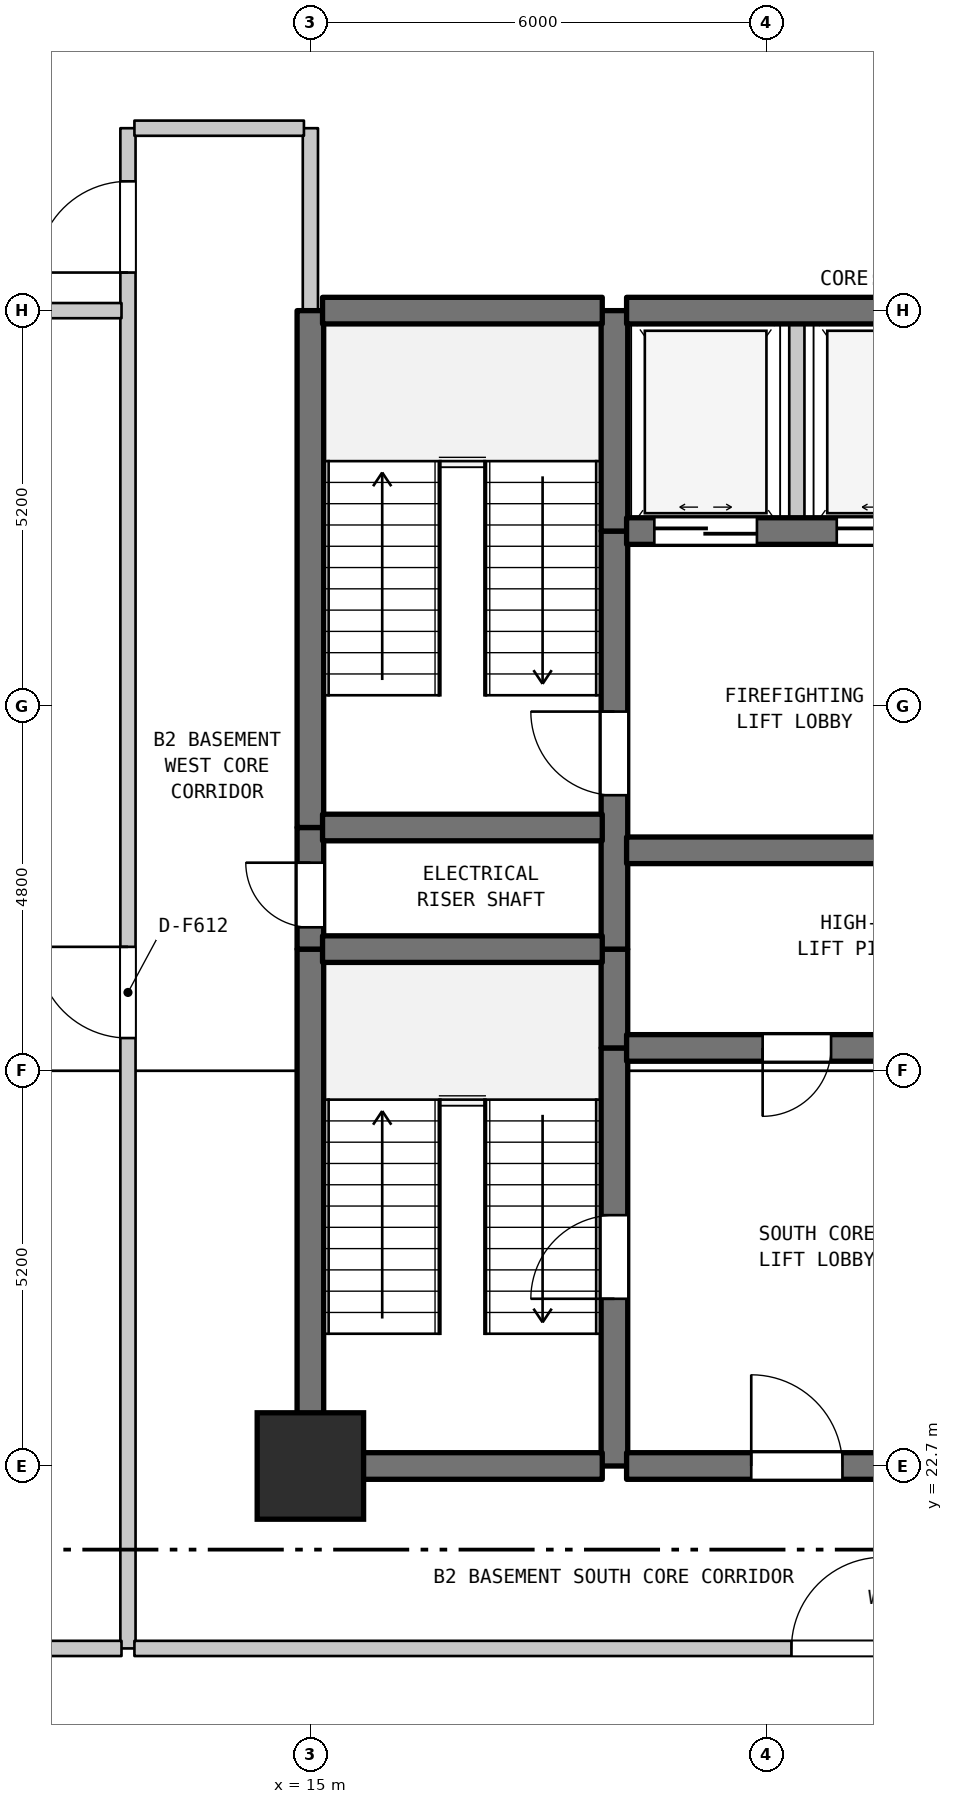
"""IFC4 building model, lengths in metres.
Left out: names, types, materials, properties, quantities, classifications, styles, units other than length and angle.
Written with IfcOpenShell. Run it as: python <this file> out.ifc"""

import sys

from ifc_helpers import new_model, si_unit, direction, frame, frame_2d, origin, origin_2d, place, context, subcontext, project, spatial, rectangle, extrude, element, fill, save


model = new_model("IFC4")
c1 = context("Model", 3, precision=1e-05, world=origin(), true_north=direction((0.0, 1.0)))
c2 = subcontext(c1, "Body", "Model", "MODEL_VIEW")
j1 = project(units=[si_unit("LENGTHUNIT", "METRE"), si_unit("PLANEANGLEUNIT", "RADIAN")], contexts=[c1])
p1 = place(None, origin())
s1 = spatial("IfcSite", under=j1, at=p1, CompositionType="ELEMENT")
p2 = place(p1, origin())
s2 = spatial("IfcBuilding", under=s1, at=p2, CompositionType="ELEMENT")
p3 = place(p2, frame((0.0, 0.0, -9.0)))
s3 = spatial("IfcBuildingStorey", under=s2, at=p3, CompositionType="ELEMENT", Elevation=-9.0)
p4 = place(p3, frame((15.0, 22.7, 0.0), z_axis=(0.0, 0.0, 1.0), x_axis=(1.0, 0.0, 0.0)))
e1 = element("IfcColumn", 1, at=p4, inside=s3, PredefinedType="COLUMN", context=c2, shape_type="SweptSolid", body=[
    extrude(rectangle(XDim=1.4, YDim=1.4, at=origin_2d()), origin(), (0.0, 0.0, 1.0), 4.5),
])
p5 = place(p3, frame((12.6, 20.3, 0.0), z_axis=(0.0, 0.0, 1.0), x_axis=(0.0, 1.0, 0.0)))
e2 = element("IfcWall", 2, at=p5, inside=s3, PredefinedType="STANDARD", context=c2, shape_type="SweptSolid", body=[
    extrude(rectangle(XDim=20.0, YDim=0.2, at=frame_2d((10.0, 0.0))), origin(), (0.0, 0.0, 1.0), 4.16),
])
p6 = place(p5, frame((8.03, 0.0, 0.0)))
e3 = element("IfcOpeningElement", 3, at=p6, cuts=e2, PredefinedType="OPENING", context=c2, shape_type="SweptSolid", body=[
    extrude(rectangle(XDim=1.2, YDim=2.2, at=frame_2d((0.6, 1.1))), frame((0.0, 0.11, 0.0), z_axis=(0.0, -1.0, 0.0), x_axis=(1.0, 0.0, 0.0)), (0.0, 0.0, 1.0), 0.22),
])
p7 = place(p5, frame((18.101, 0.0, 0.0)))
e4 = element("IfcOpeningElement", 4, at=p7, cuts=e2, PredefinedType="OPENING", context=c2, shape_type="SweptSolid", body=[
    extrude(rectangle(XDim=1.2, YDim=2.2, at=frame_2d((0.6, 1.1))), frame((0.0, 0.11, 0.0), z_axis=(0.0, -1.0, 0.0), x_axis=(1.0, 0.0, 0.0)), (0.0, 0.0, 1.0), 0.22),
])
p8 = place(p3, frame((15.0, 22.7, 0.0), z_axis=(0.0, 0.0, 1.0), x_axis=(0.0, 1.0, 0.0)))
e5 = element("IfcWall", 5, at=p8, inside=s3, PredefinedType="SHEAR", context=c2, shape_type="SweptSolid", body=[
    extrude(rectangle(XDim=6.8, YDim=0.35, at=frame_2d((3.4, 0.0))), origin(), (0.0, 0.0, 1.0), 4.16),
])
p9 = place(p3, frame((15.0, 29.5, 0.0), z_axis=(0.0, 0.0, 1.0), x_axis=(0.0, 1.0, 0.0)))
e6 = element("IfcWall", 6, at=p9, inside=s3, PredefinedType="SHEAR", context=c2, shape_type="SweptSolid", body=[
    extrude(rectangle(XDim=1.6, YDim=0.35, at=frame_2d((0.8, 0.0))), origin(), (0.0, 0.0, 1.0), 4.16),
])
p10 = place(p9, frame((0.287, 0.0, 0.0)))
e7 = element("IfcOpeningElement", 7, at=p10, cuts=e6, PredefinedType="OPENING", context=c2, shape_type="SweptSolid", body=[
    extrude(rectangle(XDim=0.85, YDim=2.1, at=frame_2d((0.425, 1.05))), frame((0.0, 0.185, 0.0), z_axis=(0.0, -1.0, 0.0), x_axis=(1.0, 0.0, 0.0)), (0.0, 0.0, 1.0), 0.37),
])
p11 = place(p3, frame((15.0, 31.1, 0.0), z_axis=(0.0, 0.0, 1.0), x_axis=(0.0, 1.0, 0.0)))
e8 = element("IfcWall", 8, at=p11, inside=s3, PredefinedType="SHEAR", context=c2, shape_type="SweptSolid", body=[
    extrude(rectangle(XDim=6.8, YDim=0.35, at=frame_2d((3.4, 0.0))), origin(), (0.0, 0.0, 1.0), 4.16),
])
p12 = place(p3, frame((15.0, 37.9, 0.0), z_axis=(0.0, 0.0, 1.0), x_axis=(0.0, 1.0, 0.0)))
e9 = element("IfcWall", 9, at=p12, inside=s3, PredefinedType="STANDARD", context=c2, shape_type="SweptSolid", body=[
    extrude(rectangle(XDim=2.4, YDim=0.2, at=frame_2d((1.2, 0.0))), origin(), (0.0, 0.0, 1.0), 4.16),
])
p13 = place(p3, frame((19.0, 22.7, 0.0), z_axis=(0.0, 0.0, 1.0), x_axis=(0.0, 1.0, 0.0)))
e10 = element("IfcWall", 10, at=p13, inside=s3, PredefinedType="SHEAR", context=c2, shape_type="SweptSolid", body=[
    extrude(rectangle(XDim=5.5, YDim=0.35, at=frame_2d((2.75, 0.0))), origin(), (0.0, 0.0, 1.0), 4.16),
])
p14 = place(p13, frame((2.2, 0.0, 0.0)))
e11 = element("IfcOpeningElement", 11, at=p14, cuts=e10, PredefinedType="OPENING", context=c2, shape_type="SweptSolid", body=[
    extrude(rectangle(XDim=1.1, YDim=2.15, at=frame_2d((0.55, 1.075))), frame((0.0, 0.185, 0.0), z_axis=(0.0, -1.0, 0.0), x_axis=(1.0, 0.0, 0.0)), (0.0, 0.0, 1.0), 0.37),
])
p15 = place(p3, frame((19.0, 28.2, 0.0), z_axis=(0.0, 0.0, 1.0), x_axis=(0.0, 1.0, 0.0)))
e12 = element("IfcWall", 12, at=p15, inside=s3, PredefinedType="SHEAR", context=c2, shape_type="SweptSolid", body=[
    extrude(rectangle(XDim=1.3, YDim=0.35, at=frame_2d((0.65, 0.0))), origin(), (0.0, 0.0, 1.0), 4.16),
])
p16 = place(p3, frame((19.0, 29.5, 0.0), z_axis=(0.0, 0.0, 1.0), x_axis=(0.0, 1.0, 0.0)))
e13 = element("IfcWall", 13, at=p16, inside=s3, PredefinedType="SHEAR", context=c2, shape_type="SweptSolid", body=[
    extrude(rectangle(XDim=5.5, YDim=0.35, at=frame_2d((2.75, 0.0))), origin(), (0.0, 0.0, 1.0), 4.16),
])
p17 = place(p16, frame((2.025, 0.0, 0.0)))
e14 = element("IfcOpeningElement", 14, at=p17, cuts=e13, PredefinedType="OPENING", context=c2, shape_type="SweptSolid", body=[
    extrude(rectangle(XDim=1.1, YDim=2.15, at=frame_2d((0.55, 1.075))), frame((0.0, 0.185, 0.0), z_axis=(0.0, -1.0, 0.0), x_axis=(1.0, 0.0, 0.0)), (0.0, 0.0, 1.0), 0.37),
])
p18 = place(p3, frame((19.0, 35.0, 0.0), z_axis=(0.0, 0.0, 1.0), x_axis=(0.0, 1.0, 0.0)))
e15 = element("IfcWall", 15, at=p18, inside=s3, PredefinedType="SHEAR", context=c2, shape_type="SweptSolid", body=[
    extrude(rectangle(XDim=2.9, YDim=0.35, at=frame_2d((1.45, 0.0))), origin(), (0.0, 0.0, 1.0), 4.16),
])
p19 = place(p3, frame((21.4, 35.0, 0.0), z_axis=(0.0, 0.0, 1.0), x_axis=(0.0, 1.0, 0.0)))
e16 = element("IfcWall", 16, at=p19, inside=s3, PredefinedType="STANDARD", context=c2, shape_type="SweptSolid", body=[
    extrude(rectangle(XDim=2.9, YDim=0.2, at=frame_2d((1.45, 0.0))), origin(), (0.0, 0.0, 1.0), 4.16),
])
p20 = place(p3, frame((2.01, 20.3, 0.0), z_axis=(0.0, 0.0, 1.0), x_axis=(1.0, 0.0, 0.0)))
e17 = element("IfcWall", 17, at=p20, inside=s3, PredefinedType="STANDARD", context=c2, shape_type="SweptSolid", body=[
    extrude(rectangle(XDim=10.505, YDim=0.2, at=frame_2d((5.252, 0.0))), origin(), (0.0, 0.0, 1.0), 4.16),
])
p21 = place(p3, frame((12.685, 20.3, 0.0), z_axis=(0.0, 0.0, 1.0), x_axis=(1.0, 0.0, 0.0)))
e18 = element("IfcWall", 18, at=p21, inside=s3, PredefinedType="STANDARD", context=c2, shape_type="SweptSolid", body=[
    extrude(rectangle(XDim=20.23, YDim=0.2, at=frame_2d((10.115, 0.0))), origin(), (0.0, 0.0, 1.0), 4.16),
])
p22 = place(p21, frame((8.644, 0.0, 0.0)))
e19 = element("IfcOpeningElement", 19, at=p22, cuts=e18, PredefinedType="OPENING", context=c2, shape_type="SweptSolid", body=[
    extrude(rectangle(XDim=1.2, YDim=2.2, at=frame_2d((0.6, 1.1))), frame((0.0, 0.11, 0.0), z_axis=(0.0, -1.0, 0.0), x_axis=(1.0, 0.0, 0.0)), (0.0, 0.0, 1.0), 0.22),
])
p23 = place(p3, frame((15.16, 22.7, 0.0), z_axis=(0.0, 0.0, 1.0), x_axis=(1.0, 0.0, 0.0)))
e20 = element("IfcWall", 20, at=p23, inside=s3, PredefinedType="SHEAR", context=c2, shape_type="SweptSolid", body=[
    extrude(rectangle(XDim=3.68, YDim=0.35, at=frame_2d((1.84, 0.0))), origin(), (0.0, 0.0, 1.0), 4.16),
])
p24 = place(p3, frame((19.16, 22.7, 0.0), z_axis=(0.0, 0.0, 1.0), x_axis=(1.0, 0.0, 0.0)))
e21 = element("IfcWall", 21, at=p24, inside=s3, PredefinedType="SHEAR", context=c2, shape_type="SweptSolid", body=[
    extrude(rectangle(XDim=4.48, YDim=0.35, at=frame_2d((2.24, 0.0))), origin(), (0.0, 0.0, 1.0), 4.16),
])
p25 = place(p24, frame((1.64, 0.0, 0.0)))
e22 = element("IfcOpeningElement", 22, at=p25, cuts=e21, PredefinedType="OPENING", context=c2, shape_type="SweptSolid", body=[
    extrude(rectangle(XDim=1.2, YDim=2.2, at=frame_2d((0.6, 1.1))), frame((0.0, 0.185, 0.0), z_axis=(0.0, -1.0, 0.0), x_axis=(1.0, 0.0, 0.0)), (0.0, 0.0, 1.0), 0.37),
])
p26 = place(p3, frame((19.16, 28.2, 0.0), z_axis=(0.0, 0.0, 1.0), x_axis=(1.0, 0.0, 0.0)))
e23 = element("IfcWall", 23, at=p26, inside=s3, PredefinedType="SHEAR", context=c2, shape_type="SweptSolid", body=[
    extrude(rectangle(XDim=4.48, YDim=0.35, at=frame_2d((2.24, 0.0))), origin(), (0.0, 0.0, 1.0), 4.16),
])
p27 = place(p26, frame((1.79, 0.0, 0.0)))
e24 = element("IfcOpeningElement", 24, at=p27, cuts=e23, PredefinedType="OPENING", context=c2, shape_type="SweptSolid", body=[
    extrude(rectangle(XDim=0.9, YDim=2.15, at=frame_2d((0.45, 1.075))), frame((0.0, 0.185, 0.0), z_axis=(0.0, -1.0, 0.0), x_axis=(1.0, 0.0, 0.0)), (0.0, 0.0, 1.0), 0.37),
])
p28 = place(p3, frame((15.16, 29.5, 0.0), z_axis=(0.0, 0.0, 1.0), x_axis=(1.0, 0.0, 0.0)))
e25 = element("IfcWall", 25, at=p28, inside=s3, PredefinedType="SHEAR", context=c2, shape_type="SweptSolid", body=[
    extrude(rectangle(XDim=3.68, YDim=0.35, at=frame_2d((1.84, 0.0))), origin(), (0.0, 0.0, 1.0), 4.16),
])
p29 = place(p3, frame((19.16, 30.8, 0.0), z_axis=(0.0, 0.0, 1.0), x_axis=(1.0, 0.0, 0.0)))
e26 = element("IfcWall", 26, at=p29, inside=s3, PredefinedType="SHEAR", context=c2, shape_type="SweptSolid", body=[
    extrude(rectangle(XDim=4.48, YDim=0.35, at=frame_2d((2.24, 0.0))), origin(), (0.0, 0.0, 1.0), 4.16),
])
p30 = place(p3, frame((15.16, 31.1, 0.0), z_axis=(0.0, 0.0, 1.0), x_axis=(1.0, 0.0, 0.0)))
e27 = element("IfcWall", 27, at=p30, inside=s3, PredefinedType="SHEAR", context=c2, shape_type="SweptSolid", body=[
    extrude(rectangle(XDim=3.68, YDim=0.35, at=frame_2d((1.84, 0.0))), origin(), (0.0, 0.0, 1.0), 4.16),
])
p31 = place(p3, frame((19.16, 35.0, 0.0), z_axis=(0.0, 0.0, 1.0), x_axis=(1.0, 0.0, 0.0)))
e28 = element("IfcWall", 28, at=p31, inside=s3, PredefinedType="SHEAR", context=c2, shape_type="SweptSolid", body=[
    extrude(rectangle(XDim=4.48, YDim=0.35, at=frame_2d((2.24, 0.0))), origin(), (0.0, 0.0, 1.0), 4.16),
])
p32 = place(p31, frame((0.365, 0.0, 0.0)))
e29 = element("IfcOpeningElement", 29, at=p32, cuts=e28, PredefinedType="OPENING", context=c2, shape_type="SweptSolid", body=[
    extrude(rectangle(XDim=1.35, YDim=2.2, at=frame_2d((0.675, 1.1))), frame((0.0, 0.185, 0.0), z_axis=(0.0, -1.0, 0.0), x_axis=(1.0, 0.0, 0.0)), (0.0, 0.0, 1.0), 0.37),
])
p33 = place(p31, frame((2.765, 0.0, 0.0)))
e30 = element("IfcOpeningElement", 30, at=p33, cuts=e28, PredefinedType="OPENING", context=c2, shape_type="SweptSolid", body=[
    extrude(rectangle(XDim=1.35, YDim=2.2, at=frame_2d((0.675, 1.1))), frame((0.0, 0.185, 0.0), z_axis=(0.0, -1.0, 0.0), x_axis=(1.0, 0.0, 0.0)), (0.0, 0.0, 1.0), 0.37),
])
p34 = place(p3, frame((15.16, 37.9, 0.0), z_axis=(0.0, 0.0, 1.0), x_axis=(1.0, 0.0, 0.0)))
e31 = element("IfcWall", 31, at=p34, inside=s3, PredefinedType="SHEAR", context=c2, shape_type="SweptSolid", body=[
    extrude(rectangle(XDim=3.68, YDim=0.35, at=frame_2d((1.84, 0.0))), origin(), (0.0, 0.0, 1.0), 4.16),
])
p35 = place(p3, frame((19.16, 37.9, 0.0), z_axis=(0.0, 0.0, 1.0), x_axis=(1.0, 0.0, 0.0)))
e32 = element("IfcWall", 32, at=p35, inside=s3, PredefinedType="SHEAR", context=c2, shape_type="SweptSolid", body=[
    extrude(rectangle(XDim=4.48, YDim=0.35, at=frame_2d((2.24, 0.0))), origin(), (0.0, 0.0, 1.0), 4.16),
])
p36 = place(p3, frame((12.685, 40.3, 0.0), z_axis=(0.0, 0.0, 1.0), x_axis=(1.0, 0.0, 0.0)))
e33 = element("IfcWall", 33, at=p36, inside=s3, PredefinedType="STANDARD", context=c2, shape_type="SweptSolid", body=[
    extrude(rectangle(XDim=2.23, YDim=0.2, at=frame_2d((1.115, 0.0))), origin(), (0.0, 0.0, 1.0), 4.16),
])
p37 = place(p3, frame((9.0, 37.9, 0.0), z_axis=(0.0, 0.0, 1.0), x_axis=(1.0, 0.0, 0.0)))
e34 = element("IfcWall", 34, at=p37, inside=s3, PredefinedType="STANDARD", context=c2, shape_type="SweptSolid", body=[
    extrude(rectangle(XDim=3.515, YDim=0.2, at=frame_2d((1.757, 0.0))), origin(), (0.0, 0.0, 1.0), 3.26),
])
p38 = place(p6, origin())
e35 = element("IfcDoor", 35, at=p38, inside=s3, OperationType="SINGLE_SWING_RIGHT", PredefinedType="DOOR", context=c2, shape_type="SweptSolid", body=[
    extrude(rectangle(XDim=1.2, YDim=2.2, at=frame_2d((0.6, 1.1))), frame((0.0, 0.025, 0.0), z_axis=(0.0, -1.0, 0.0), x_axis=(1.0, 0.0, 0.0)), (0.0, 0.0, 1.0), 0.05),
])
fill(e3, e35)
p39 = place(p7, origin())
e36 = element("IfcDoor", 36, at=p39, inside=s3, OperationType="SINGLE_SWING_LEFT", PredefinedType="DOOR", context=c2, shape_type="SweptSolid", body=[
    extrude(rectangle(XDim=1.2, YDim=2.2, at=frame_2d((0.6, 1.1))), frame((0.0, 0.025, 0.0), z_axis=(0.0, -1.0, 0.0), x_axis=(1.0, 0.0, 0.0)), (0.0, 0.0, 1.0), 0.05),
])
fill(e4, e36)
p40 = place(p10, origin())
e37 = element("IfcDoor", 37, at=p40, inside=s3, OperationType="SINGLE_SWING_RIGHT", PredefinedType="DOOR", context=c2, shape_type="SweptSolid", body=[
    extrude(rectangle(XDim=0.85, YDim=2.1, at=frame_2d((0.425, 1.05))), frame((0.0, 0.025, 0.0), z_axis=(0.0, -1.0, 0.0), x_axis=(1.0, 0.0, 0.0)), (0.0, 0.0, 1.0), 0.05),
])
fill(e7, e37)
p41 = place(p14, origin())
e38 = element("IfcDoor", 38, at=p41, inside=s3, OperationType="SINGLE_SWING_LEFT", PredefinedType="DOOR", context=c2, shape_type="SweptSolid", body=[
    extrude(rectangle(XDim=1.1, YDim=2.15, at=frame_2d((0.55, 1.075))), frame((0.0, 0.025, 0.0), z_axis=(0.0, -1.0, 0.0), x_axis=(1.0, 0.0, 0.0)), (0.0, 0.0, 1.0), 0.05),
])
fill(e11, e38)
p42 = place(p17, origin())
e39 = element("IfcDoor", 39, at=p42, inside=s3, OperationType="SINGLE_SWING_RIGHT", PredefinedType="DOOR", context=c2, shape_type="SweptSolid", body=[
    extrude(rectangle(XDim=1.1, YDim=2.15, at=frame_2d((0.55, 1.075))), frame((0.0, 0.025, 0.0), z_axis=(0.0, -1.0, 0.0), x_axis=(1.0, 0.0, 0.0)), (0.0, 0.0, 1.0), 0.05),
])
fill(e14, e39)
p43 = place(p22, origin())
e40 = element("IfcDoor", 40, at=p43, inside=s3, OperationType="SINGLE_SWING_RIGHT", PredefinedType="DOOR", context=c2, shape_type="SweptSolid", body=[
    extrude(rectangle(XDim=1.2, YDim=2.2, at=frame_2d((0.6, 1.1))), frame((0.0, 0.025, 0.0), z_axis=(0.0, -1.0, 0.0), x_axis=(1.0, 0.0, 0.0)), (0.0, 0.0, 1.0), 0.05),
])
fill(e19, e40)
p44 = place(p25, origin())
e41 = element("IfcDoor", 41, at=p44, inside=s3, OperationType="SINGLE_SWING_LEFT", PredefinedType="DOOR", context=c2, shape_type="SweptSolid", body=[
    extrude(rectangle(XDim=1.2, YDim=2.2, at=frame_2d((0.6, 1.1))), frame((0.0, 0.025, 0.0), z_axis=(0.0, -1.0, 0.0), x_axis=(1.0, 0.0, 0.0)), (0.0, 0.0, 1.0), 0.05),
])
fill(e22, e41)
p45 = place(p27, frame((0.9, 0.0, 0.0), z_axis=(0.0, 0.0, 1.0), x_axis=(-1.0, 0.0, 0.0)))
e42 = element("IfcDoor", 42, at=p45, inside=s3, OperationType="SINGLE_SWING_LEFT", PredefinedType="DOOR", context=c2, shape_type="SweptSolid", body=[
    extrude(rectangle(XDim=0.9, YDim=2.15, at=frame_2d((0.45, 1.075))), frame((0.0, 0.025, 0.0), z_axis=(0.0, -1.0, 0.0), x_axis=(1.0, 0.0, 0.0)), (0.0, 0.0, 1.0), 0.05),
])
fill(e24, e42)
p46 = place(p32, origin())
e43 = element("IfcDoor", 43, at=p46, inside=s3, OperationType="DOUBLE_DOOR_SLIDING", PredefinedType="DOOR", context=c2, shape_type="SweptSolid", body=[
    extrude(rectangle(XDim=1.35, YDim=2.2, at=frame_2d((0.675, 1.1))), frame((0.0, 0.025, 0.0), z_axis=(0.0, -1.0, 0.0), x_axis=(1.0, 0.0, 0.0)), (0.0, 0.0, 1.0), 0.05),
])
fill(e29, e43)
p47 = place(p33, origin())
e44 = element("IfcDoor", 44, at=p47, inside=s3, OperationType="DOUBLE_DOOR_SLIDING", PredefinedType="DOOR", context=c2, shape_type="SweptSolid", body=[
    extrude(rectangle(XDim=1.35, YDim=2.2, at=frame_2d((0.675, 1.1))), frame((0.0, 0.025, 0.0), z_axis=(0.0, -1.0, 0.0), x_axis=(1.0, 0.0, 0.0)), (0.0, 0.0, 1.0), 0.05),
])
fill(e30, e44)
save(model, sys.argv[1])
